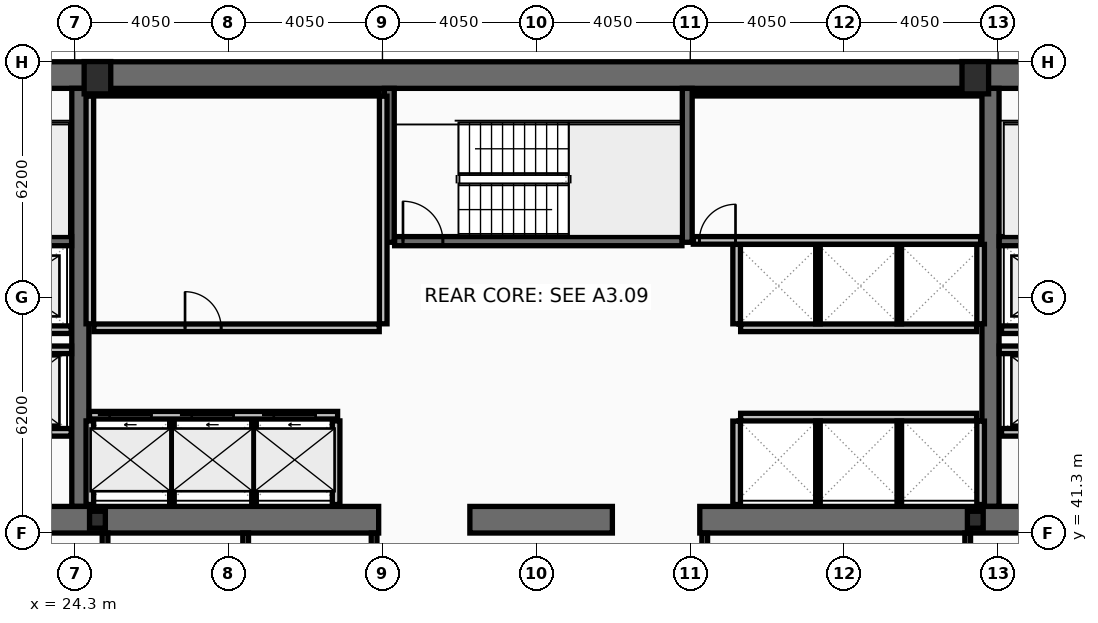
"""IFC4 building model, lengths in metres.
Left out: names, types, materials, properties, quantities, classifications, styles, units other than length and angle.
Written with IfcOpenShell. Run it as: python <this file> out.ifc"""

import sys

from ifc_helpers import new_model, si_unit, direction, frame, frame_2d, origin, origin_2d, place, context, subcontext, project, spatial, rectangle, hollow_rectangle, i_section, extrude, element, fill, save


model = new_model("IFC4")
c1 = context("Model", 3, precision=1e-05, world=origin(), true_north=direction((0.0, 1.0)))
c2 = subcontext(c1, "Body", "Model", "MODEL_VIEW")
j1 = project(units=[si_unit("LENGTHUNIT", "METRE"), si_unit("PLANEANGLEUNIT", "RADIAN")], contexts=[c1])
p1 = place(None, origin())
s1 = spatial("IfcSite", under=j1, at=p1, CompositionType="ELEMENT")
p2 = place(p1, origin())
s2 = spatial("IfcBuilding", under=s1, at=p2, CompositionType="ELEMENT")
p3 = place(p2, frame((0.0, 0.0, 143.4)))
s3 = spatial("IfcBuildingStorey", under=s2, at=p3, CompositionType="ELEMENT", Elevation=143.4)
p4 = place(p3, frame((16.2, 53.35, 0.0), z_axis=(0.0, 0.0, 1.0), x_axis=(1.0, 0.0, 0.0)))
e1 = element("IfcWall", 1, at=p4, inside=s3, PredefinedType="SHEAR", context=c2, shape_type="SweptSolid", body=[
    extrude(rectangle(XDim=40.5, YDim=0.7, at=frame_2d((20.25, 0.0))), origin(), (0.0, 0.0, 1.0), 3.44),
])
for number, where, z_axis, x_axis in (
    (2, (24.45, 42.0, 0.0), (0.0, 0.0, 1.0), (0.0, 1.0, 0.0)),
    (3, (48.4, 42.0, 0.0), (0.0, 0.0, 1.0), (0.0, 1.0, 0.0)),
):
    element("IfcWall", number, at=place(p3, frame(where, z_axis=z_axis, x_axis=x_axis)), inside=s3, PredefinedType="SHEAR", context=c2, shape_type="SweptSolid", body=[
        extrude(rectangle(XDim=11.0, YDim=0.45, at=frame_2d((5.5, 0.0))), origin(), (0.0, 0.0, 1.0), 3.44),
    ])
p5 = place(p3, frame((32.3, 41.65, 0.0), z_axis=(0.0, 0.0, 1.0), x_axis=(-1.0, 0.0, 0.0)))
e4 = element("IfcWall", 4, at=p5, inside=s3, PredefinedType="SHEAR", context=c2, shape_type="SweptSolid", body=[
    extrude(rectangle(XDim=11.45, YDim=0.7, at=frame_2d((5.725, 0.0))), origin(), (0.0, 0.0, 1.0), 3.44),
])
p6 = place(p3, frame((38.45, 41.65, 0.0), z_axis=(0.0, 0.0, 1.0), x_axis=(-1.0, 0.0, 0.0)))
e5 = element("IfcWall", 5, at=p6, inside=s3, PredefinedType="SHEAR", context=c2, shape_type="SweptSolid", body=[
    extrude(rectangle(XDim=3.75, YDim=0.7, at=frame_2d((1.875, 0.0))), origin(), (0.0, 0.0, 1.0), 3.44),
])
p7 = place(p3, frame((52.05, 41.65, 0.0), z_axis=(0.0, 0.0, 1.0), x_axis=(-1.0, 0.0, 0.0)))
e6 = element("IfcWall", 6, at=p7, inside=s3, PredefinedType="SHEAR", context=c2, shape_type="SweptSolid", body=[
    extrude(rectangle(XDim=11.3, YDim=0.7, at=frame_2d((5.65, 0.0))), origin(), (0.0, 0.0, 1.0), 3.44),
])
for number, where, z_axis, x_axis in (
    (7, (32.58, 48.95, 0.0), (0.0, 0.0, 1.0), (0.0, 1.0, 0.0)),
    (8, (40.42, 48.95, 0.0), (0.0, 0.0, 1.0), (0.0, 1.0, 0.0)),
):
    element("IfcWall", number, at=place(p3, frame(where, z_axis=z_axis, x_axis=x_axis)), inside=s3, PredefinedType="SHEAR", context=c2, shape_type="SweptSolid", body=[
        extrude(rectangle(XDim=4.05, YDim=0.26, at=frame_2d((2.025, 0.0))), origin(), (0.0, 0.0, 1.0), 3.44),
    ])
p8 = place(p3, frame((16.9, 48.98, 0.0), z_axis=(0.0, 0.0, 1.0), x_axis=(1.0, 0.0, 0.0)))
e9 = element("IfcWall", 9, at=p8, inside=s3, PredefinedType="SHEAR", context=c2, shape_type="SweptSolid", body=[
    extrude(rectangle(XDim=7.32, YDim=0.24, at=frame_2d((3.66, 0.0))), origin(), (0.0, 0.0, 1.0), 3.44),
])
p9 = place(p8, frame((0.22, 0.0, 0.0)))
e10 = element("IfcOpeningElement", 10, at=p9, cuts=e9, PredefinedType="OPENING", context=c2, shape_type="SweptSolid", body=[
    extrude(rectangle(XDim=1.05, YDim=2.15, at=frame_2d((0.525, 1.075))), frame((0.0, 0.13, 0.0), z_axis=(0.0, -1.0, 0.0), x_axis=(1.0, 0.0, 0.0)), (0.0, 0.0, 1.0), 0.26),
])
p10 = place(p3, frame((48.63, 48.98, 0.0), z_axis=(0.0, 0.0, 1.0), x_axis=(1.0, 0.0, 0.0)))
e11 = element("IfcWall", 11, at=p10, inside=s3, PredefinedType="SHEAR", context=c2, shape_type="SweptSolid", body=[
    extrude(rectangle(XDim=7.37, YDim=0.24, at=frame_2d((3.685, 0.0))), origin(), (0.0, 0.0, 1.0), 3.44),
])
p11 = place(p10, frame((6.1, 0.0, 0.0)))
e12 = element("IfcOpeningElement", 12, at=p11, cuts=e11, PredefinedType="OPENING", context=c2, shape_type="SweptSolid", body=[
    extrude(rectangle(XDim=1.05, YDim=2.15, at=frame_2d((0.525, 1.075))), frame((0.0, 0.13, 0.0), z_axis=(0.0, -1.0, 0.0), x_axis=(1.0, 0.0, 0.0)), (0.0, 0.0, 1.0), 0.26),
])
p12 = place(p3, frame((32.72, 48.98, 0.0), z_axis=(0.0, 0.0, 1.0), x_axis=(1.0, 0.0, 0.0)))
e13 = element("IfcWall", 13, at=p12, inside=s3, PredefinedType="SHEAR", context=c2, shape_type="SweptSolid", body=[
    extrude(rectangle(XDim=7.56, YDim=0.24, at=frame_2d((3.78, 0.0))), origin(), (0.0, 0.0, 1.0), 3.44),
])
p13 = place(p12, frame((0.22, 0.0, 0.0)))
e14 = element("IfcOpeningElement", 14, at=p13, cuts=e13, PredefinedType="OPENING", context=c2, shape_type="SweptSolid", body=[
    extrude(rectangle(XDim=1.05, YDim=2.15, at=frame_2d((0.525, 1.075))), frame((0.0, 0.13, 0.0), z_axis=(0.0, -1.0, 0.0), x_axis=(1.0, 0.0, 0.0)), (0.0, 0.0, 1.0), 0.26),
])
for number, where, z_axis, x_axis in (
    (15, (24.9, 53.28, 0.0), (0.0, 0.0, 1.0), (1.0, 0.0, 0.0)),
    (16, (48.0, 53.28, 0.0), (0.0, 0.0, 1.0), (1.0, 0.0, 0.0)),
):
    element("IfcColumn", number, at=place(p3, frame(where, z_axis=z_axis, x_axis=x_axis)), inside=s3, PredefinedType="COLUMN", context=c2, shape_type="SweptSolid", body=[
        extrude(hollow_rectangle(XDim=0.7, YDim=0.85, WallThickness=0.05, at=origin_2d()), origin(), (0.0, 0.0, 1.0), 3.6),
    ])
for number, where, z_axis, x_axis in (
    (17, (24.9, 41.65, 0.0), (0.0, 0.0, 1.0), (1.0, 0.0, 0.0)),
    (18, (48.0, 41.65, 0.0), (0.0, 0.0, 1.0), (1.0, 0.0, 0.0)),
):
    element("IfcColumn", number, at=place(p3, frame(where, z_axis=z_axis, x_axis=x_axis)), inside=s3, PredefinedType="COLUMN", context=c2, shape_type="SweptSolid", body=[
        extrude(i_section(OverallWidth=0.416, OverallDepth=0.446, WebThickness=0.039, FlangeThickness=0.063, at=origin_2d()), origin(), (0.0, 0.0, 1.0), 3.6),
    ])
p14 = place(p3, frame((24.69, 44.4, 0.0), z_axis=(0.0, 0.0, 1.0), x_axis=(1.0, 0.0, 0.0)))
e19 = element("IfcWall", 19, at=p14, inside=s3, PredefinedType="PARTITIONING", context=c2, shape_type="SweptSolid", body=[
    extrude(rectangle(XDim=6.53, YDim=0.2, at=frame_2d((3.265, 0.0))), origin(), (0.0, 0.0, 1.0), 3.44),
])
p15 = place(p14, frame((0.53, 0.0, 0.0)))
e20 = element("IfcOpeningElement", 20, at=p15, cuts=e19, PredefinedType="OPENING", context=c2, shape_type="SweptSolid", body=[
    extrude(rectangle(XDim=1.1, YDim=2.18, at=frame_2d((0.55, 1.09))), frame((0.0, 0.11, 0.0), z_axis=(0.0, -1.0, 0.0), x_axis=(1.0, 0.0, 0.0)), (0.0, 0.0, 1.0), 0.22),
])
p16 = place(p14, frame((2.69, 0.0, 0.0)))
e21 = element("IfcOpeningElement", 21, at=p16, cuts=e19, PredefinedType="OPENING", context=c2, shape_type="SweptSolid", body=[
    extrude(rectangle(XDim=1.1, YDim=2.18, at=frame_2d((0.55, 1.09))), frame((0.0, 0.11, 0.0), z_axis=(0.0, -1.0, 0.0), x_axis=(1.0, 0.0, 0.0)), (0.0, 0.0, 1.0), 0.22),
])
p17 = place(p14, frame((4.85, 0.0, 0.0)))
e22 = element("IfcOpeningElement", 22, at=p17, cuts=e19, PredefinedType="OPENING", context=c2, shape_type="SweptSolid", body=[
    extrude(rectangle(XDim=1.1, YDim=2.18, at=frame_2d((0.55, 1.09))), frame((0.0, 0.11, 0.0), z_axis=(0.0, -1.0, 0.0), x_axis=(1.0, 0.0, 0.0)), (0.0, 0.0, 1.0), 0.22),
])
p18 = place(p3, frame((51.61, 43.95, 0.0), z_axis=(0.0, 0.0, 1.0), x_axis=(-1.0, 0.0, 0.0)))
e23 = element("IfcWall", 23, at=p18, inside=s3, PredefinedType="PARTITIONING", context=c2, shape_type="SweptSolid", body=[
    extrude(rectangle(XDim=2.92, YDim=0.2, at=frame_2d((1.46, 0.0))), origin(), (0.0, 0.0, 1.0), 3.44),
])
p19 = place(p18, frame((0.81, 0.0, 0.0)))
e24 = element("IfcOpeningElement", 24, at=p19, cuts=e23, PredefinedType="OPENING", context=c2, shape_type="SweptSolid", body=[
    extrude(rectangle(XDim=1.3, YDim=2.18, at=frame_2d((0.65, 1.09))), frame((0.0, 0.11, 0.0), z_axis=(0.0, -1.0, 0.0), x_axis=(1.0, 0.0, 0.0)), (0.0, 0.0, 1.0), 0.22),
])
p20 = place(p3, frame((24.21, 43.95, 0.0), z_axis=(0.0, 0.0, 1.0), x_axis=(-1.0, 0.0, 0.0)))
e25 = element("IfcWall", 25, at=p20, inside=s3, PredefinedType="PARTITIONING", context=c2, shape_type="SweptSolid", body=[
    extrude(rectangle(XDim=2.97, YDim=0.2, at=frame_2d((1.485, 0.0))), origin(), (0.0, 0.0, 1.0), 3.44),
])
p21 = place(p20, frame((0.86, 0.0, 0.0)))
e26 = element("IfcOpeningElement", 26, at=p21, cuts=e25, PredefinedType="OPENING", context=c2, shape_type="SweptSolid", body=[
    extrude(rectangle(XDim=1.3, YDim=2.18, at=frame_2d((0.65, 1.09))), frame((0.0, 0.11, 0.0), z_axis=(0.0, -1.0, 0.0), x_axis=(1.0, 0.0, 0.0)), (0.0, 0.0, 1.0), 0.22),
])
p22 = place(p3, frame((51.61, 46.65, 0.0), z_axis=(0.0, 0.0, 1.0), x_axis=(-1.0, 0.0, 0.0)))
e27 = element("IfcWall", 27, at=p22, inside=s3, PredefinedType="PARTITIONING", context=c2, shape_type="SweptSolid", body=[
    extrude(rectangle(XDim=2.92, YDim=0.2, at=frame_2d((1.46, 0.0))), origin(), (0.0, 0.0, 1.0), 3.44),
])
p23 = place(p22, frame((0.86, 0.0, 0.0)))
e28 = element("IfcOpeningElement", 28, at=p23, cuts=e27, PredefinedType="OPENING", context=c2, shape_type="SweptSolid", body=[
    extrude(rectangle(XDim=1.2, YDim=2.18, at=frame_2d((0.6, 1.09))), frame((0.0, 0.11, 0.0), z_axis=(0.0, -1.0, 0.0), x_axis=(1.0, 0.0, 0.0)), (0.0, 0.0, 1.0), 0.22),
])
p24 = place(p3, frame((24.21, 46.65, 0.0), z_axis=(0.0, 0.0, 1.0), x_axis=(-1.0, 0.0, 0.0)))
e29 = element("IfcWall", 29, at=p24, inside=s3, PredefinedType="PARTITIONING", context=c2, shape_type="SweptSolid", body=[
    extrude(rectangle(XDim=2.97, YDim=0.2, at=frame_2d((1.485, 0.0))), origin(), (0.0, 0.0, 1.0), 3.44),
])
p25 = place(p24, frame((0.91, 0.0, 0.0)))
e30 = element("IfcOpeningElement", 30, at=p25, cuts=e29, PredefinedType="OPENING", context=c2, shape_type="SweptSolid", body=[
    extrude(rectangle(XDim=1.2, YDim=2.18, at=frame_2d((0.6, 1.09))), frame((0.0, 0.11, 0.0), z_axis=(0.0, -1.0, 0.0), x_axis=(1.0, 0.0, 0.0)), (0.0, 0.0, 1.0), 0.22),
])
p26 = place(p3, frame((21.2, 46.12, 0.0), z_axis=(0.0, 0.0, 1.0), x_axis=(1.0, 0.0, 0.0)))
e31 = element("IfcWall", 31, at=p26, inside=s3, PredefinedType="PARTITIONING", context=c2, shape_type="SweptSolid", body=[
    extrude(rectangle(XDim=3.02, YDim=0.2, at=frame_2d((1.51, 0.0))), origin(), (0.0, 0.0, 1.0), 3.44),
])
p27 = place(p3, frame((48.63, 46.12, 0.0), z_axis=(0.0, 0.0, 1.0), x_axis=(1.0, 0.0, 0.0)))
e32 = element("IfcWall", 32, at=p27, inside=s3, PredefinedType="PARTITIONING", context=c2, shape_type="SweptSolid", body=[
    extrude(rectangle(XDim=3.07, YDim=0.2, at=frame_2d((1.535, 0.0))), origin(), (0.0, 0.0, 1.0), 3.44),
])
for number, where, z_axis, x_axis in (
    (33, (24.7, 46.805, 0.0), (0.0, 0.0, 1.0), (0.0, 1.0, 0.0)),
    (34, (32.42, 46.805, 0.0), (0.0, 0.0, 1.0), (0.0, 1.0, 0.0)),
):
    element("IfcWall", number, at=place(p3, frame(where, z_axis=z_axis, x_axis=x_axis)), inside=s3, PredefinedType="PARTITIONING", context=c2, shape_type="SweptSolid", body=[
        extrude(rectangle(XDim=5.99, YDim=0.2, at=frame_2d((2.995, 0.0))), origin(), (0.0, 0.0, 1.0), 3.44),
    ])
p28 = place(p3, frame((24.805, 52.86, 0.0), z_axis=(0.0, 0.0, 1.0), x_axis=(1.0, 0.0, 0.0)))
e35 = element("IfcWall", 35, at=p28, inside=s3, PredefinedType="PARTITIONING", context=c2, shape_type="SweptSolid", body=[
    extrude(rectangle(XDim=7.51, YDim=0.12, at=frame_2d((3.755, 0.0))), origin(), (0.0, 0.0, 1.0), 3.44),
])
p29 = place(p3, frame((24.805, 46.7, 0.0), z_axis=(0.0, 0.0, 1.0), x_axis=(1.0, 0.0, 0.0)))
e36 = element("IfcWall", 36, at=p29, inside=s3, PredefinedType="PARTITIONING", context=c2, shape_type="SweptSolid", body=[
    extrude(rectangle(XDim=7.51, YDim=0.2, at=frame_2d((3.755, 0.0))), origin(), (0.0, 0.0, 1.0), 3.44),
])
p30 = place(p29, frame((2.4, 0.0, 0.0)))
e37 = element("IfcOpeningElement", 37, at=p30, cuts=e36, PredefinedType="OPENING", context=c2, shape_type="SweptSolid", body=[
    extrude(rectangle(XDim=0.95, YDim=2.1, at=frame_2d((0.475, 1.05))), frame((0.0, 0.11, 0.0), z_axis=(0.0, -1.0, 0.0), x_axis=(1.0, 0.0, 0.0)), (0.0, 0.0, 1.0), 0.22),
])
for number, where, z_axis, x_axis in (
    (38, (24.7, 42.05, 0.0), (0.0, 0.0, 1.0), (0.0, 1.0, 0.0)),
    (39, (31.18, 42.05, 0.0), (0.0, 0.0, 1.0), (0.0, 1.0, 0.0)),
):
    element("IfcWall", number, at=place(p3, frame(where, z_axis=z_axis, x_axis=x_axis)), inside=s3, PredefinedType="PARTITIONING", context=c2, shape_type="SweptSolid", body=[
        extrude(rectangle(XDim=2.2, YDim=0.2, at=frame_2d((1.1, 0.0))), origin(), (0.0, 0.0, 1.0), 3.44),
    ])
for number, where, z_axis, x_axis in (
    (40, (26.86, 42.05, 0.0), (0.0, 0.0, 1.0), (0.0, 1.0, 0.0)),
    (41, (29.02, 42.05, 0.0), (0.0, 0.0, 1.0), (0.0, 1.0, 0.0)),
):
    element("IfcWall", number, at=place(p3, frame(where, z_axis=z_axis, x_axis=x_axis)), inside=s3, PredefinedType="PARTITIONING", context=c2, shape_type="SweptSolid", body=[
        extrude(rectangle(XDim=2.2, YDim=0.12, at=frame_2d((1.1, 0.0))), origin(), (0.0, 0.0, 1.0), 3.44),
    ])
p31 = place(p3, frame((41.825, 46.7, 0.0), z_axis=(0.0, 0.0, 1.0), x_axis=(1.0, 0.0, 0.0)))
e42 = element("IfcWall", 42, at=p31, inside=s3, PredefinedType="PARTITIONING", context=c2, shape_type="SweptSolid", body=[
    extrude(rectangle(XDim=6.21, YDim=0.2, at=frame_2d((3.105, 0.0))), origin(), (0.0, 0.0, 1.0), 3.44),
])
for number, where, z_axis, x_axis in (
    (43, (41.72, 46.805, 0.0), (0.0, 0.0, 1.0), (0.0, 1.0, 0.0)),
    (44, (48.14, 46.805, 0.0), (0.0, 0.0, 1.0), (0.0, 1.0, 0.0)),
):
    element("IfcWall", number, at=place(p3, frame(where, z_axis=z_axis, x_axis=x_axis)), inside=s3, PredefinedType="PARTITIONING", context=c2, shape_type="SweptSolid", body=[
        extrude(rectangle(XDim=2.09, YDim=0.2, at=frame_2d((1.045, 0.0))), origin(), (0.0, 0.0, 1.0), 3.44),
    ])
for number, where, z_axis, x_axis in (
    (45, (43.86, 46.805, 0.0), (0.0, 0.0, 1.0), (0.0, 1.0, 0.0)),
    (46, (46.0, 46.805, 0.0), (0.0, 0.0, 1.0), (0.0, 1.0, 0.0)),
):
    element("IfcWall", number, at=place(p3, frame(where, z_axis=z_axis, x_axis=x_axis)), inside=s3, PredefinedType="PARTITIONING", context=c2, shape_type="SweptSolid", body=[
        extrude(rectangle(XDim=2.09, YDim=0.12, at=frame_2d((1.045, 0.0))), origin(), (0.0, 0.0, 1.0), 3.44),
    ])
p32 = place(p3, frame((41.825, 44.35, 0.0), z_axis=(0.0, 0.0, 1.0), x_axis=(1.0, 0.0, 0.0)))
e47 = element("IfcWall", 47, at=p32, inside=s3, PredefinedType="PARTITIONING", context=c2, shape_type="SweptSolid", body=[
    extrude(rectangle(XDim=6.21, YDim=0.2, at=frame_2d((3.105, 0.0))), origin(), (0.0, 0.0, 1.0), 3.44),
])
for number, where, z_axis, x_axis in (
    (48, (41.72, 42.05, 0.0), (0.0, 0.0, 1.0), (0.0, 1.0, 0.0)),
    (49, (48.14, 42.05, 0.0), (0.0, 0.0, 1.0), (0.0, 1.0, 0.0)),
):
    element("IfcWall", number, at=place(p3, frame(where, z_axis=z_axis, x_axis=x_axis)), inside=s3, PredefinedType="PARTITIONING", context=c2, shape_type="SweptSolid", body=[
        extrude(rectangle(XDim=2.195, YDim=0.2, at=frame_2d((1.098, 0.0))), origin(), (0.0, 0.0, 1.0), 3.44),
    ])
for number, where, z_axis, x_axis in (
    (50, (43.86, 42.05, 0.0), (0.0, 0.0, 1.0), (0.0, 1.0, 0.0)),
    (51, (46.0, 42.05, 0.0), (0.0, 0.0, 1.0), (0.0, 1.0, 0.0)),
):
    element("IfcWall", number, at=place(p3, frame(where, z_axis=z_axis, x_axis=x_axis)), inside=s3, PredefinedType="PARTITIONING", context=c2, shape_type="SweptSolid", body=[
        extrude(rectangle(XDim=2.195, YDim=0.12, at=frame_2d((1.098, 0.0))), origin(), (0.0, 0.0, 1.0), 3.44),
    ])
p33 = place(p3, frame((40.58, 52.86, 0.0), z_axis=(0.0, 0.0, 1.0), x_axis=(1.0, 0.0, 0.0)))
e52 = element("IfcWall", 52, at=p33, inside=s3, PredefinedType="PARTITIONING", context=c2, shape_type="SweptSolid", body=[
    extrude(rectangle(XDim=7.56, YDim=0.12, at=frame_2d((3.78, 0.0))), origin(), (0.0, 0.0, 1.0), 3.44),
])
p34 = place(p3, frame((40.58, 49.0, 0.0), z_axis=(0.0, 0.0, 1.0), x_axis=(1.0, 0.0, 0.0)))
e53 = element("IfcWall", 53, at=p34, inside=s3, PredefinedType="PARTITIONING", context=c2, shape_type="SweptSolid", body=[
    extrude(rectangle(XDim=7.56, YDim=0.2, at=frame_2d((3.78, 0.0))), origin(), (0.0, 0.0, 1.0), 3.44),
])
p35 = place(p34, frame((0.16, 0.0, 0.0)))
e54 = element("IfcOpeningElement", 54, at=p35, cuts=e53, PredefinedType="OPENING", context=c2, shape_type="SweptSolid", body=[
    extrude(rectangle(XDim=0.95, YDim=2.1, at=frame_2d((0.475, 1.05))), frame((0.0, 0.11, 0.0), z_axis=(0.0, -1.0, 0.0), x_axis=(1.0, 0.0, 0.0)), (0.0, 0.0, 1.0), 0.22),
])
p36 = place(p3, frame((25.1, 38.28, 0.0), z_axis=(0.0, 0.0, 1.0), x_axis=(0.0, 1.0, 0.0)))
e55 = element("IfcWall", 55, at=p36, inside=s3, PredefinedType="PARTITIONING", context=c2, shape_type="SweptSolid", body=[
    extrude(rectangle(XDim=3.02, YDim=0.15, at=frame_2d((1.51, 0.0))), origin(), (0.0, 0.0, 1.0), 2.73),
])
for number, where, z_axis, x_axis in (
    (56, (28.8, 38.28, 0.0), (0.0, 0.0, 1.0), (0.0, 1.0, 0.0)),
    (57, (32.18, 38.28, 0.0), (0.0, 0.0, 1.0), (0.0, 1.0, 0.0)),
    (58, (40.88, 38.28, 0.0), (0.0, 0.0, 1.0), (0.0, 1.0, 0.0)),
):
    element("IfcWall", number, at=place(p3, frame(where, z_axis=z_axis, x_axis=x_axis)), inside=s3, PredefinedType="PARTITIONING", context=c2, shape_type="SweptSolid", body=[
        extrude(rectangle(XDim=3.02, YDim=0.15, at=frame_2d((1.51, 0.0))), origin(), (0.0, 0.0, 1.0), 3.44),
    ])
p37 = place(p3, frame((47.8, 38.28, 0.0), z_axis=(0.0, 0.0, 1.0), x_axis=(0.0, 1.0, 0.0)))
e59 = element("IfcWall", 59, at=p37, inside=s3, PredefinedType="PARTITIONING", context=c2, shape_type="SweptSolid", body=[
    extrude(rectangle(XDim=3.02, YDim=0.15, at=frame_2d((1.51, 0.0))), origin(), (0.0, 0.0, 1.0), 2.73),
])
p38 = place(p13, origin())
e60 = element("IfcDoor", 60, at=p38, inside=s3, OperationType="SINGLE_SWING_LEFT", PredefinedType="DOOR", context=c2, shape_type="SweptSolid", body=[
    extrude(rectangle(XDim=1.05, YDim=2.15, at=frame_2d((0.525, 1.075))), frame((0.0, 0.025, 0.0), z_axis=(0.0, -1.0, 0.0), x_axis=(1.0, 0.0, 0.0)), (0.0, 0.0, 1.0), 0.05),
])
fill(e14, e60)
p39 = place(p15, origin())
e61 = element("IfcDoor", 61, at=p39, inside=s3, OperationType="SLIDING_TO_LEFT", PredefinedType="DOOR", context=c2, shape_type="SweptSolid", body=[
    extrude(rectangle(XDim=1.1, YDim=2.18, at=frame_2d((0.55, 1.09))), frame((0.0, 0.025, 0.0), z_axis=(0.0, -1.0, 0.0), x_axis=(1.0, 0.0, 0.0)), (0.0, 0.0, 1.0), 0.05),
])
fill(e20, e61)
p40 = place(p16, origin())
e62 = element("IfcDoor", 62, at=p40, inside=s3, OperationType="SLIDING_TO_LEFT", PredefinedType="DOOR", context=c2, shape_type="SweptSolid", body=[
    extrude(rectangle(XDim=1.1, YDim=2.18, at=frame_2d((0.55, 1.09))), frame((0.0, 0.025, 0.0), z_axis=(0.0, -1.0, 0.0), x_axis=(1.0, 0.0, 0.0)), (0.0, 0.0, 1.0), 0.05),
])
fill(e21, e62)
p41 = place(p17, origin())
e63 = element("IfcDoor", 63, at=p41, inside=s3, OperationType="SLIDING_TO_LEFT", PredefinedType="DOOR", context=c2, shape_type="SweptSolid", body=[
    extrude(rectangle(XDim=1.1, YDim=2.18, at=frame_2d((0.55, 1.09))), frame((0.0, 0.025, 0.0), z_axis=(0.0, -1.0, 0.0), x_axis=(1.0, 0.0, 0.0)), (0.0, 0.0, 1.0), 0.05),
])
fill(e22, e63)
p42 = place(p30, origin())
e64 = element("IfcDoor", 64, at=p42, inside=s3, OperationType="SINGLE_SWING_LEFT", PredefinedType="DOOR", context=c2, shape_type="SweptSolid", body=[
    extrude(rectangle(XDim=0.95, YDim=2.1, at=frame_2d((0.475, 1.05))), frame((0.0, 0.025, 0.0), z_axis=(0.0, -1.0, 0.0), x_axis=(1.0, 0.0, 0.0)), (0.0, 0.0, 1.0), 0.05),
])
fill(e37, e64)
p43 = place(p35, origin())
e65 = element("IfcDoor", 65, at=p43, inside=s3, OperationType="SINGLE_SWING_RIGHT", PredefinedType="DOOR", context=c2, shape_type="SweptSolid", body=[
    extrude(rectangle(XDim=0.95, YDim=2.1, at=frame_2d((0.475, 1.05))), frame((0.0, 0.025, 0.0), z_axis=(0.0, -1.0, 0.0), x_axis=(1.0, 0.0, 0.0)), (0.0, 0.0, 1.0), 0.05),
])
fill(e54, e65)
save(model, sys.argv[1])
